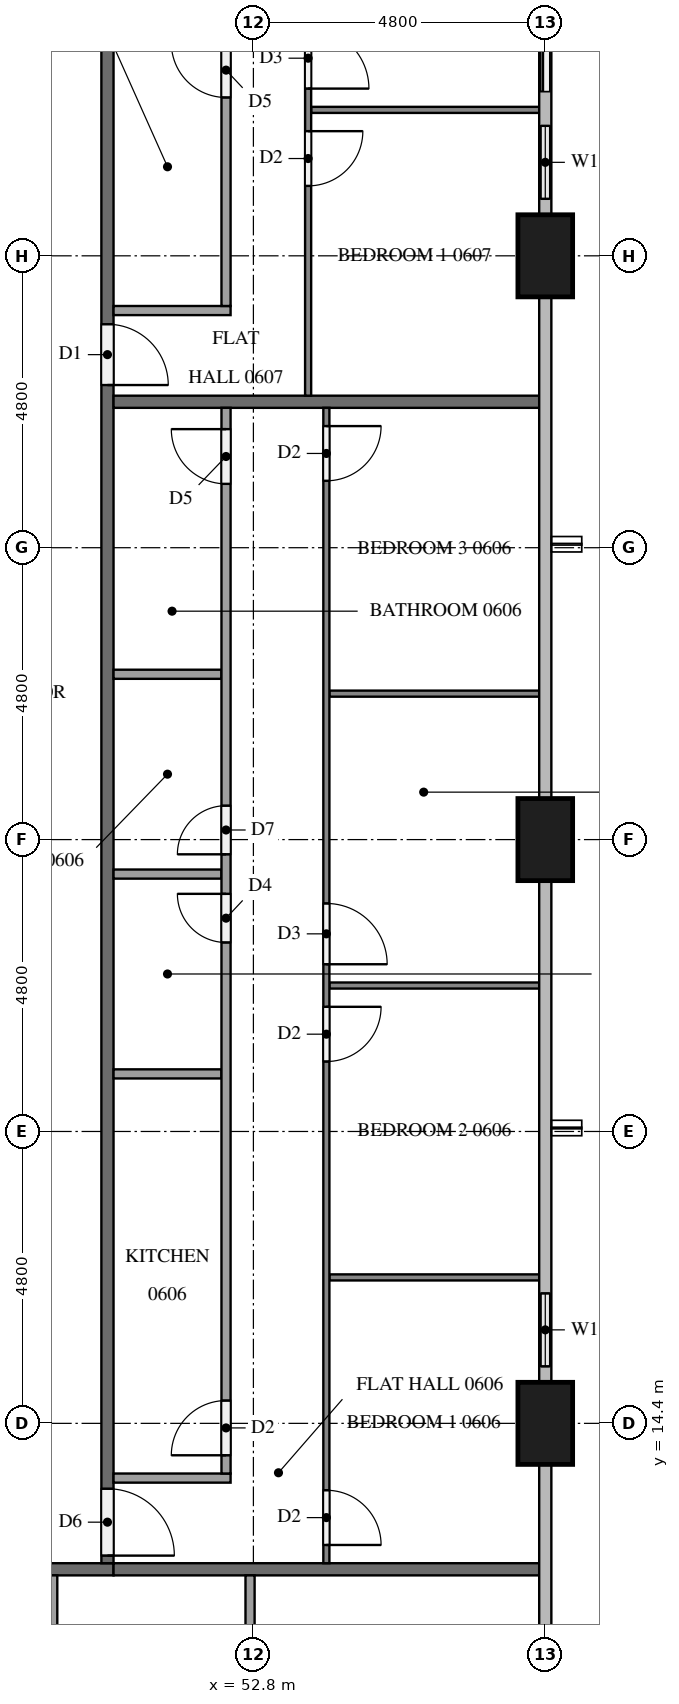
"""IFC4 building model, lengths in metres.
Left out: names, types, materials, properties, quantities, classifications, styles, units other than length and angle.
Written with IfcOpenShell. Run it as: python <this file> out.ifc"""

import sys

from ifc_helpers import new_model, si_unit, direction, frame, frame_2d, origin, origin_2d, place, context, subcontext, project, spatial, rectangle, extrude, element, fill, save


model = new_model("IFC4")
c1 = context("Model", 3, precision=1e-05, world=origin(), true_north=direction((0.0, 1.0)))
c2 = subcontext(c1, "Body", "Model", "MODEL_VIEW")
j1 = project(units=[si_unit("LENGTHUNIT", "METRE"), si_unit("PLANEANGLEUNIT", "RADIAN")], contexts=[c1])
p1 = place(None, origin())
s1 = spatial("IfcSite", under=j1, at=p1, CompositionType="ELEMENT")
p2 = place(p1, origin())
s2 = spatial("IfcBuilding", under=s1, at=p2, CompositionType="ELEMENT")
p3 = place(p2, frame((0.0, 0.0, 29.4)))
s3 = spatial("IfcBuildingStorey", under=s2, at=p3, CompositionType="ELEMENT", Elevation=29.4)
for number, where, z_axis, x_axis in (
    (1, (57.6, 14.4, 0.0), (0.0, 0.0, 1.0), (0.0, 1.0, 0.0)),
    (2, (57.6, 24.0, 0.0), (0.0, 0.0, 1.0), (0.0, 1.0, 0.0)),
    (3, (57.6, 33.6, 0.0), (0.0, 0.0, 1.0), (0.0, 1.0, 0.0)),
):
    element("IfcColumn", number, at=place(p3, frame(where, z_axis=z_axis, x_axis=x_axis)), inside=s3, PredefinedType="COLUMN", context=c2, shape_type="SweptSolid", body=[
        extrude(rectangle(XDim=1.35, YDim=0.9, at=origin_2d()), origin(), (0.0, 0.0, 1.0), 3.2),
    ])
p4 = place(p3, frame((57.6, 15.075, 0.0), z_axis=(0.0, 0.0, 1.0), x_axis=(0.0, 1.0, 0.0)))
e4 = element("IfcWall", 4, at=p4, inside=s3, PredefinedType="SOLIDWALL", context=c2, shape_type="SweptSolid", body=[
    extrude(rectangle(XDim=1.725, YDim=0.15, at=frame_2d((0.863, 0.0))), origin(), (0.0, 0.0, 1.0), 3.2),
])
p5 = place(p4, frame((0.262, 0.0, 0.9)))
e5 = element("IfcOpeningElement", 5, at=p5, cuts=e4, PredefinedType="OPENING", context=c2, shape_type="SweptSolid", body=[
    extrude(rectangle(XDim=1.2, YDim=1.4, at=frame_2d((0.6, 0.7))), frame((0.0, 0.085, 0.0), z_axis=(0.0, -1.0, 0.0), x_axis=(1.0, 0.0, 0.0)), (0.0, 0.0, 1.0), 0.17),
])
p6 = place(p3, frame((57.6, 34.275, 0.0), z_axis=(0.0, 0.0, 1.0), x_axis=(0.0, 1.0, 0.0)))
e6 = element("IfcWall", 6, at=p6, inside=s3, PredefinedType="SOLIDWALL", context=c2, shape_type="SweptSolid", body=[
    extrude(rectangle(XDim=4.125, YDim=0.15, at=frame_2d((2.062, 0.0))), origin(), (0.0, 0.0, 1.0), 3.2),
])
p7 = place(p6, frame((0.262, 0.0, 0.9)))
e7 = element("IfcOpeningElement", 7, at=p7, cuts=e6, PredefinedType="OPENING", context=c2, shape_type="SweptSolid", body=[
    extrude(rectangle(XDim=1.2, YDim=1.4, at=frame_2d((0.6, 0.7))), frame((0.0, 0.085, 0.0), z_axis=(0.0, -1.0, 0.0), x_axis=(1.0, 0.0, 0.0)), (0.0, 0.0, 1.0), 0.17),
])
p8 = place(p6, frame((2.025, 0.0, 0.0)))
e8 = element("IfcOpeningElement", 8, at=p8, cuts=e6, PredefinedType="OPENING", context=c2, shape_type="SweptSolid", body=[
    extrude(rectangle(XDim=1.8, YDim=2.4, at=frame_2d((0.9, 1.2))), frame((0.0, 0.085, 0.0), z_axis=(0.0, -1.0, 0.0), x_axis=(1.0, 0.0, 0.0)), (0.0, 0.0, 1.0), 0.17),
])
p9 = place(p3, frame((50.5, 12.0, 0.0), z_axis=(0.0, 0.0, 1.0), x_axis=(-1.0, 0.0, 0.0)))
e9 = element("IfcWall", 9, at=p9, inside=s3, PredefinedType="PARTITIONING", context=c2, shape_type="SweptSolid", body=[
    extrude(rectangle(XDim=38.6, YDim=0.2, at=frame_2d((19.3, 0.0))), origin(), (0.0, 0.0, 1.0), 3.2),
])
p10 = place(p9, frame((36.375, 0.0, 0.0)))
e10 = element("IfcOpeningElement", 10, at=p10, cuts=e9, PredefinedType="OPENING", context=c2, shape_type="SweptSolid", body=[
    extrude(rectangle(XDim=1.0, YDim=2.1, at=frame_2d((0.5, 1.05))), frame((0.0, 0.11, 0.0), z_axis=(0.0, -1.0, 0.0), x_axis=(1.0, 0.0, 0.0)), (0.0, 0.0, 1.0), 0.22),
])
p11 = place(p9, frame((34.825, 0.0, 0.0)))
e11 = element("IfcOpeningElement", 11, at=p11, cuts=e9, PredefinedType="OPENING", context=c2, shape_type="SweptSolid", body=[
    extrude(rectangle(XDim=1.0, YDim=2.1, at=frame_2d((0.5, 1.05))), frame((0.0, 0.11, 0.0), z_axis=(0.0, -1.0, 0.0), x_axis=(1.0, 0.0, 0.0)), (0.0, 0.0, 1.0), 0.22),
])
p12 = place(p9, frame((22.825, 0.0, 0.0)))
e12 = element("IfcOpeningElement", 12, at=p12, cuts=e9, PredefinedType="OPENING", context=c2, shape_type="SweptSolid", body=[
    extrude(rectangle(XDim=1.0, YDim=2.1, at=frame_2d((0.5, 1.05))), frame((0.0, 0.11, 0.0), z_axis=(0.0, -1.0, 0.0), x_axis=(1.0, 0.0, 0.0)), (0.0, 0.0, 1.0), 0.22),
])
p13 = place(p9, frame((8.425, 0.0, 0.0)))
e13 = element("IfcOpeningElement", 13, at=p13, cuts=e9, PredefinedType="OPENING", context=c2, shape_type="SweptSolid", body=[
    extrude(rectangle(XDim=1.0, YDim=2.1, at=frame_2d((0.5, 1.05))), frame((0.0, 0.11, 0.0), z_axis=(0.0, -1.0, 0.0), x_axis=(1.0, 0.0, 0.0)), (0.0, 0.0, 1.0), 0.22),
])
p14 = place(p9, frame((1.225, 0.0, 0.0)))
e14 = element("IfcOpeningElement", 14, at=p14, cuts=e9, PredefinedType="OPENING", context=c2, shape_type="SweptSolid", body=[
    extrude(rectangle(XDim=1.0, YDim=2.1, at=frame_2d((0.5, 1.05))), frame((0.0, 0.11, 0.0), z_axis=(0.0, -1.0, 0.0), x_axis=(1.0, 0.0, 0.0)), (0.0, 0.0, 1.0), 0.22),
])
p15 = place(p3, frame((50.4, 40.7, 0.0), z_axis=(0.0, 0.0, 1.0), x_axis=(0.0, -1.0, 0.0)))
e15 = element("IfcWall", 15, at=p15, inside=s3, PredefinedType="PARTITIONING", context=c2, shape_type="SweptSolid", body=[
    extrude(rectangle(XDim=28.6, YDim=0.2, at=frame_2d((14.3, 0.0))), origin(), (0.0, 0.0, 1.0), 3.2),
])
p16 = place(p15, frame((27.375, 0.0, 0.0)))
e16 = element("IfcOpeningElement", 16, at=p16, cuts=e15, PredefinedType="OPENING", context=c2, shape_type="SweptSolid", body=[
    extrude(rectangle(XDim=1.1, YDim=2.1, at=frame_2d((0.55, 1.05))), frame((0.0, 0.11, 0.0), z_axis=(0.0, -1.0, 0.0), x_axis=(1.0, 0.0, 0.0)), (0.0, 0.0, 1.0), 0.22),
])
p17 = place(p15, frame((8.225, 0.0, 0.0)))
e17 = element("IfcOpeningElement", 17, at=p17, cuts=e15, PredefinedType="OPENING", context=c2, shape_type="SweptSolid", body=[
    extrude(rectangle(XDim=1.0, YDim=2.1, at=frame_2d((0.5, 1.05))), frame((0.0, 0.11, 0.0), z_axis=(0.0, -1.0, 0.0), x_axis=(1.0, 0.0, 0.0)), (0.0, 0.0, 1.0), 0.22),
])
for number, where, z_axis, x_axis in (
    (18, (50.5, 12.0, 0.0), (0.0, 0.0, 1.0), (1.0, 0.0, 0.0)),
    (19, (50.5, 31.2, 0.0), (0.0, 0.0, 1.0), (1.0, 0.0, 0.0)),
):
    element("IfcWall", number, at=place(p3, frame(where, z_axis=z_axis, x_axis=x_axis)), inside=s3, PredefinedType="PARTITIONING", context=c2, shape_type="SweptSolid", body=[
        extrude(rectangle(XDim=7.0, YDim=0.2, at=frame_2d((3.5, 0.0))), origin(), (0.0, 0.0, 1.0), 3.2),
    ])
p18 = place(p3, frame((52.745, 11.9, 0.0), z_axis=(0.0, 0.0, 1.0), x_axis=(0.0, -1.0, 0.0)))
e20 = element("IfcWall", 20, at=p18, inside=s3, PredefinedType="PARTITIONING", context=c2, shape_type="SweptSolid", body=[
    extrude(rectangle(XDim=3.275, YDim=0.15, at=frame_2d((1.637, 0.0))), origin(), (0.0, 0.0, 1.0), 3.2),
])
p19 = place(p3, frame((49.5, 11.9, 0.0), z_axis=(0.0, 0.0, 1.0), x_axis=(0.0, -1.0, 0.0)))
e21 = element("IfcWall", 21, at=p19, inside=s3, PredefinedType="PARTITIONING", context=c2, shape_type="SweptSolid", body=[
    extrude(rectangle(XDim=3.425, YDim=0.15, at=frame_2d((1.712, 0.0))), origin(), (0.0, 0.0, 1.0), 3.2),
])
for number, where, z_axis, x_axis in (
    (22, (54.05, 16.8, 0.0), (0.0, 0.0, 1.0), (1.0, 0.0, 0.0)),
    (23, (54.05, 21.6, 0.0), (0.0, 0.0, 1.0), (1.0, 0.0, 0.0)),
    (24, (54.05, 26.4, 0.0), (0.0, 0.0, 1.0), (1.0, 0.0, 0.0)),
):
    element("IfcWall", number, at=place(p3, frame(where, z_axis=z_axis, x_axis=x_axis)), inside=s3, PredefinedType="PARTITIONING", context=c2, shape_type="SweptSolid", body=[
        extrude(rectangle(XDim=3.45, YDim=0.1, at=frame_2d((1.725, 0.0))), origin(), (0.0, 0.0, 1.0), 3.2),
    ])
p20 = place(p3, frame((54.0, 31.1, 0.0), z_axis=(0.0, 0.0, 1.0), x_axis=(0.0, -1.0, 0.0)))
e25 = element("IfcWall", 25, at=p20, inside=s3, PredefinedType="PARTITIONING", context=c2, shape_type="SweptSolid", body=[
    extrude(rectangle(XDim=19.0, YDim=0.1, at=frame_2d((9.5, 0.0))), origin(), (0.0, 0.0, 1.0), 3.2),
])
p21 = place(p20, frame((17.8, 0.0, 0.0)))
e26 = element("IfcOpeningElement", 26, at=p21, cuts=e25, PredefinedType="OPENING", context=c2, shape_type="SweptSolid", body=[
    extrude(rectangle(XDim=0.9, YDim=2.1, at=frame_2d((0.45, 1.05))), frame((0.0, 0.06, 0.0), z_axis=(0.0, -1.0, 0.0), x_axis=(1.0, 0.0, 0.0)), (0.0, 0.0, 1.0), 0.12),
])
p22 = place(p20, frame((9.85, 0.0, 0.0)))
e27 = element("IfcOpeningElement", 27, at=p22, cuts=e25, PredefinedType="OPENING", context=c2, shape_type="SweptSolid", body=[
    extrude(rectangle(XDim=0.9, YDim=2.1, at=frame_2d((0.45, 1.05))), frame((0.0, 0.06, 0.0), z_axis=(0.0, -1.0, 0.0), x_axis=(1.0, 0.0, 0.0)), (0.0, 0.0, 1.0), 0.12),
])
p23 = place(p20, frame((8.15, 0.0, 0.0)))
e28 = element("IfcOpeningElement", 28, at=p23, cuts=e25, PredefinedType="OPENING", context=c2, shape_type="SweptSolid", body=[
    extrude(rectangle(XDim=1.0, YDim=2.1, at=frame_2d((0.5, 1.05))), frame((0.0, 0.06, 0.0), z_axis=(0.0, -1.0, 0.0), x_axis=(1.0, 0.0, 0.0)), (0.0, 0.0, 1.0), 0.12),
])
p24 = place(p20, frame((0.3, 0.0, 0.0)))
e29 = element("IfcOpeningElement", 29, at=p24, cuts=e25, PredefinedType="OPENING", context=c2, shape_type="SweptSolid", body=[
    extrude(rectangle(XDim=0.9, YDim=2.1, at=frame_2d((0.45, 1.05))), frame((0.0, 0.06, 0.0), z_axis=(0.0, -1.0, 0.0), x_axis=(1.0, 0.0, 0.0)), (0.0, 0.0, 1.0), 0.12),
])
for number, where, z_axis, x_axis in (
    (30, (50.5, 20.147, 0.0), (0.0, 0.0, 1.0), (1.0, 0.0, 0.0)),
    (31, (50.5, 23.433, 0.0), (0.0, 0.0, 1.0), (1.0, 0.0, 0.0)),
    (32, (50.5, 26.719, 0.0), (0.0, 0.0, 1.0), (1.0, 0.0, 0.0)),
):
    element("IfcWall", number, at=place(p3, frame(where, z_axis=z_axis, x_axis=x_axis)), inside=s3, PredefinedType="PARTITIONING", context=c2, shape_type="SweptSolid", body=[
        extrude(rectangle(XDim=1.775, YDim=0.15, at=frame_2d((0.887, 0.0))), origin(), (0.0, 0.0, 1.0), 3.2),
    ])
p25 = place(p3, frame((50.5, 13.5, 0.0), z_axis=(0.0, 0.0, 1.0), x_axis=(1.0, 0.0, 0.0)))
e33 = element("IfcWall", 33, at=p25, inside=s3, PredefinedType="PARTITIONING", context=c2, shape_type="SweptSolid", body=[
    extrude(rectangle(XDim=1.925, YDim=0.15, at=frame_2d((0.962, 0.0))), origin(), (0.0, 0.0, 1.0), 3.2),
])
p26 = place(p3, frame((52.35, 13.575, 0.0), z_axis=(0.0, 0.0, 1.0), x_axis=(0.0, 1.0, 0.0)))
e34 = element("IfcWall", 34, at=p26, inside=s3, PredefinedType="PARTITIONING", context=c2, shape_type="SweptSolid", body=[
    extrude(rectangle(XDim=17.525, YDim=0.15, at=frame_2d((8.763, 0.0))), origin(), (0.0, 0.0, 1.0), 3.2),
])
p27 = place(p26, frame((0.3, 0.0, 0.0)))
e35 = element("IfcOpeningElement", 35, at=p27, cuts=e34, PredefinedType="OPENING", context=c2, shape_type="SweptSolid", body=[
    extrude(rectangle(XDim=0.9, YDim=2.1, at=frame_2d((0.45, 1.05))), frame((0.0, 0.085, 0.0), z_axis=(0.0, -1.0, 0.0), x_axis=(1.0, 0.0, 0.0)), (0.0, 0.0, 1.0), 0.17),
])
p28 = place(p26, frame((8.733, 0.0, 0.0)))
e36 = element("IfcOpeningElement", 36, at=p28, cuts=e34, PredefinedType="OPENING", context=c2, shape_type="SweptSolid", body=[
    extrude(rectangle(XDim=0.8, YDim=2.1, at=frame_2d((0.4, 1.05))), frame((0.0, 0.085, 0.0), z_axis=(0.0, -1.0, 0.0), x_axis=(1.0, 0.0, 0.0)), (0.0, 0.0, 1.0), 0.17),
])
p29 = place(p26, frame((10.183, 0.0, 0.0)))
e37 = element("IfcOpeningElement", 37, at=p29, cuts=e34, PredefinedType="OPENING", context=c2, shape_type="SweptSolid", body=[
    extrude(rectangle(XDim=0.8, YDim=2.1, at=frame_2d((0.4, 1.05))), frame((0.0, 0.085, 0.0), z_axis=(0.0, -1.0, 0.0), x_axis=(1.0, 0.0, 0.0)), (0.0, 0.0, 1.0), 0.17),
])
p30 = place(p26, frame((16.275, 0.0, 0.0)))
e38 = element("IfcOpeningElement", 38, at=p30, cuts=e34, PredefinedType="OPENING", context=c2, shape_type="SweptSolid", body=[
    extrude(rectangle(XDim=0.9, YDim=2.1, at=frame_2d((0.45, 1.05))), frame((0.0, 0.085, 0.0), z_axis=(0.0, -1.0, 0.0), x_axis=(1.0, 0.0, 0.0)), (0.0, 0.0, 1.0), 0.17),
])
p31 = place(p3, frame((53.75, 36.0, 0.0), z_axis=(0.0, 0.0, 1.0), x_axis=(1.0, 0.0, 0.0)))
e39 = element("IfcWall", 39, at=p31, inside=s3, PredefinedType="PARTITIONING", context=c2, shape_type="SweptSolid", body=[
    extrude(rectangle(XDim=3.75, YDim=0.1, at=frame_2d((1.875, 0.0))), origin(), (0.0, 0.0, 1.0), 3.2),
])
p32 = place(p3, frame((53.7, 47.659, 0.0), z_axis=(0.0, 0.0, 1.0), x_axis=(0.0, -1.0, 0.0)))
e40 = element("IfcWall", 40, at=p32, inside=s3, PredefinedType="PARTITIONING", context=c2, shape_type="SweptSolid", body=[
    extrude(rectangle(XDim=16.359, YDim=0.1, at=frame_2d((8.179, 0.0))), origin(), (0.0, 0.0, 1.0), 3.2),
])
p33 = place(p32, frame((12.009, 0.0, 0.0)))
e41 = element("IfcOpeningElement", 41, at=p33, cuts=e40, PredefinedType="OPENING", context=c2, shape_type="SweptSolid", body=[
    extrude(rectangle(XDim=0.9, YDim=2.1, at=frame_2d((0.45, 1.05))), frame((0.0, 0.06, 0.0), z_axis=(0.0, -1.0, 0.0), x_axis=(1.0, 0.0, 0.0)), (0.0, 0.0, 1.0), 0.12),
])
p34 = place(p32, frame((10.309, 0.0, 0.0)))
e42 = element("IfcOpeningElement", 42, at=p34, cuts=e40, PredefinedType="OPENING", context=c2, shape_type="SweptSolid", body=[
    extrude(rectangle(XDim=1.0, YDim=2.1, at=frame_2d((0.5, 1.05))), frame((0.0, 0.06, 0.0), z_axis=(0.0, -1.0, 0.0), x_axis=(1.0, 0.0, 0.0)), (0.0, 0.0, 1.0), 0.12),
])
p35 = place(p32, frame((0.3, 0.0, 0.0)))
e43 = element("IfcOpeningElement", 43, at=p35, cuts=e40, PredefinedType="OPENING", context=c2, shape_type="SweptSolid", body=[
    extrude(rectangle(XDim=0.9, YDim=2.1, at=frame_2d((0.45, 1.05))), frame((0.0, 0.06, 0.0), z_axis=(0.0, -1.0, 0.0), x_axis=(1.0, 0.0, 0.0)), (0.0, 0.0, 1.0), 0.12),
])
p36 = place(p3, frame((50.5, 32.7, 0.0), z_axis=(0.0, 0.0, 1.0), x_axis=(1.0, 0.0, 0.0)))
e44 = element("IfcWall", 44, at=p36, inside=s3, PredefinedType="PARTITIONING", context=c2, shape_type="SweptSolid", body=[
    extrude(rectangle(XDim=1.925, YDim=0.15, at=frame_2d((0.962, 0.0))), origin(), (0.0, 0.0, 1.0), 3.2),
])
p37 = place(p3, frame((52.35, 32.775, 0.0), z_axis=(0.0, 0.0, 1.0), x_axis=(0.0, 1.0, 0.0)))
e45 = element("IfcWall", 45, at=p37, inside=s3, PredefinedType="PARTITIONING", context=c2, shape_type="SweptSolid", body=[
    extrude(rectangle(XDim=14.6, YDim=0.15, at=frame_2d((7.3, 0.0))), origin(), (0.0, 0.0, 1.0), 3.2),
])
p38 = place(p37, frame((3.429, 0.0, 0.0)))
e46 = element("IfcOpeningElement", 46, at=p38, cuts=e45, PredefinedType="OPENING", context=c2, shape_type="SweptSolid", body=[
    extrude(rectangle(XDim=0.9, YDim=2.1, at=frame_2d((0.45, 1.05))), frame((0.0, 0.085, 0.0), z_axis=(0.0, -1.0, 0.0), x_axis=(1.0, 0.0, 0.0)), (0.0, 0.0, 1.0), 0.17),
])
p39 = place(p37, frame((4.979, 0.0, 0.0)))
e47 = element("IfcOpeningElement", 47, at=p39, cuts=e45, PredefinedType="OPENING", context=c2, shape_type="SweptSolid", body=[
    extrude(rectangle(XDim=0.8, YDim=2.1, at=frame_2d((0.4, 1.05))), frame((0.0, 0.085, 0.0), z_axis=(0.0, -1.0, 0.0), x_axis=(1.0, 0.0, 0.0)), (0.0, 0.0, 1.0), 0.17),
])
p40 = place(p37, frame((13.4, 0.0, 0.0)))
e48 = element("IfcOpeningElement", 48, at=p40, cuts=e45, PredefinedType="OPENING", context=c2, shape_type="SweptSolid", body=[
    extrude(rectangle(XDim=0.9, YDim=2.1, at=frame_2d((0.45, 1.05))), frame((0.0, 0.085, 0.0), z_axis=(0.0, -1.0, 0.0), x_axis=(1.0, 0.0, 0.0)), (0.0, 0.0, 1.0), 0.17),
])
p41 = place(p5, origin())
e49 = element("IfcWindow", 49, at=p41, inside=s3, PartitioningType="SINGLE_PANEL", PredefinedType="WINDOW", context=c2, shape_type="SweptSolid", body=[
    extrude(rectangle(XDim=1.2, YDim=1.4, at=frame_2d((0.6, 0.7))), frame((0.0, 0.03, 0.0), z_axis=(0.0, -1.0, 0.0), x_axis=(1.0, 0.0, 0.0)), (0.0, 0.0, 1.0), 0.06),
])
fill(e5, e49)
p42 = place(p7, origin())
e50 = element("IfcWindow", 50, at=p42, inside=s3, PartitioningType="SINGLE_PANEL", PredefinedType="WINDOW", context=c2, shape_type="SweptSolid", body=[
    extrude(rectangle(XDim=1.2, YDim=1.4, at=frame_2d((0.6, 0.7))), frame((0.0, 0.03, 0.0), z_axis=(0.0, -1.0, 0.0), x_axis=(1.0, 0.0, 0.0)), (0.0, 0.0, 1.0), 0.06),
])
fill(e7, e50)
p43 = place(p8, origin())
e51 = element("IfcDoor", 51, at=p43, inside=s3, OperationType="SLIDING_TO_RIGHT", PredefinedType="DOOR", context=c2, shape_type="SweptSolid", body=[
    extrude(rectangle(XDim=1.8, YDim=2.4, at=frame_2d((0.9, 1.2))), frame((0.0, 0.025, 0.0), z_axis=(0.0, -1.0, 0.0), x_axis=(1.0, 0.0, 0.0)), (0.0, 0.0, 1.0), 0.05),
])
fill(e8, e51)
p44 = place(p16, origin())
e52 = element("IfcDoor", 52, at=p44, inside=s3, OperationType="SINGLE_SWING_RIGHT", PredefinedType="DOOR", context=c2, shape_type="SweptSolid", body=[
    extrude(rectangle(XDim=1.1, YDim=2.1, at=frame_2d((0.55, 1.05))), frame((0.0, 0.025, 0.0), z_axis=(0.0, -1.0, 0.0), x_axis=(1.0, 0.0, 0.0)), (0.0, 0.0, 1.0), 0.05),
])
fill(e16, e52)
p45 = place(p17, origin())
e53 = element("IfcDoor", 53, at=p45, inside=s3, OperationType="SINGLE_SWING_RIGHT", PredefinedType="DOOR", context=c2, shape_type="SweptSolid", body=[
    extrude(rectangle(XDim=1.0, YDim=2.1, at=frame_2d((0.5, 1.05))), frame((0.0, 0.025, 0.0), z_axis=(0.0, -1.0, 0.0), x_axis=(1.0, 0.0, 0.0)), (0.0, 0.0, 1.0), 0.05),
])
fill(e17, e53)
p46 = place(p21, origin())
e54 = element("IfcDoor", 54, at=p46, inside=s3, OperationType="SINGLE_SWING_RIGHT", PredefinedType="DOOR", context=c2, shape_type="SweptSolid", body=[
    extrude(rectangle(XDim=0.9, YDim=2.1, at=frame_2d((0.45, 1.05))), frame((0.0, 0.025, 0.0), z_axis=(0.0, -1.0, 0.0), x_axis=(1.0, 0.0, 0.0)), (0.0, 0.0, 1.0), 0.05),
])
fill(e26, e54)
p47 = place(p22, origin())
e55 = element("IfcDoor", 55, at=p47, inside=s3, OperationType="SINGLE_SWING_LEFT", PredefinedType="DOOR", context=c2, shape_type="SweptSolid", body=[
    extrude(rectangle(XDim=0.9, YDim=2.1, at=frame_2d((0.45, 1.05))), frame((0.0, 0.025, 0.0), z_axis=(0.0, -1.0, 0.0), x_axis=(1.0, 0.0, 0.0)), (0.0, 0.0, 1.0), 0.05),
])
fill(e27, e55)
p48 = place(p23, origin())
e56 = element("IfcDoor", 56, at=p48, inside=s3, OperationType="SINGLE_SWING_RIGHT", PredefinedType="DOOR", context=c2, shape_type="SweptSolid", body=[
    extrude(rectangle(XDim=1.0, YDim=2.1, at=frame_2d((0.5, 1.05))), frame((0.0, 0.025, 0.0), z_axis=(0.0, -1.0, 0.0), x_axis=(1.0, 0.0, 0.0)), (0.0, 0.0, 1.0), 0.05),
])
fill(e28, e56)
p49 = place(p24, origin())
e57 = element("IfcDoor", 57, at=p49, inside=s3, OperationType="SINGLE_SWING_LEFT", PredefinedType="DOOR", context=c2, shape_type="SweptSolid", body=[
    extrude(rectangle(XDim=0.9, YDim=2.1, at=frame_2d((0.45, 1.05))), frame((0.0, 0.025, 0.0), z_axis=(0.0, -1.0, 0.0), x_axis=(1.0, 0.0, 0.0)), (0.0, 0.0, 1.0), 0.05),
])
fill(e29, e57)
p50 = place(p27, origin())
e58 = element("IfcDoor", 58, at=p50, inside=s3, OperationType="SINGLE_SWING_LEFT", PredefinedType="DOOR", context=c2, shape_type="SweptSolid", body=[
    extrude(rectangle(XDim=0.9, YDim=2.1, at=frame_2d((0.45, 1.05))), frame((0.0, 0.025, 0.0), z_axis=(0.0, -1.0, 0.0), x_axis=(1.0, 0.0, 0.0)), (0.0, 0.0, 1.0), 0.05),
])
fill(e35, e58)
p51 = place(p28, origin())
e59 = element("IfcDoor", 59, at=p51, inside=s3, OperationType="SINGLE_SWING_RIGHT", PredefinedType="DOOR", context=c2, shape_type="SweptSolid", body=[
    extrude(rectangle(XDim=0.8, YDim=2.1, at=frame_2d((0.4, 1.05))), frame((0.0, 0.025, 0.0), z_axis=(0.0, -1.0, 0.0), x_axis=(1.0, 0.0, 0.0)), (0.0, 0.0, 1.0), 0.05),
])
fill(e36, e59)
p52 = place(p29, origin())
e60 = element("IfcDoor", 60, at=p52, inside=s3, OperationType="SINGLE_SWING_LEFT", PredefinedType="DOOR", context=c2, shape_type="SweptSolid", body=[
    extrude(rectangle(XDim=0.8, YDim=2.1, at=frame_2d((0.4, 1.05))), frame((0.0, 0.025, 0.0), z_axis=(0.0, -1.0, 0.0), x_axis=(1.0, 0.0, 0.0)), (0.0, 0.0, 1.0), 0.05),
])
fill(e37, e60)
p53 = place(p30, origin())
e61 = element("IfcDoor", 61, at=p53, inside=s3, OperationType="SINGLE_SWING_RIGHT", PredefinedType="DOOR", context=c2, shape_type="SweptSolid", body=[
    extrude(rectangle(XDim=0.9, YDim=2.1, at=frame_2d((0.45, 1.05))), frame((0.0, 0.025, 0.0), z_axis=(0.0, -1.0, 0.0), x_axis=(1.0, 0.0, 0.0)), (0.0, 0.0, 1.0), 0.05),
])
fill(e38, e61)
p54 = place(p33, origin())
e62 = element("IfcDoor", 62, at=p54, inside=s3, OperationType="SINGLE_SWING_LEFT", PredefinedType="DOOR", context=c2, shape_type="SweptSolid", body=[
    extrude(rectangle(XDim=0.9, YDim=2.1, at=frame_2d((0.45, 1.05))), frame((0.0, 0.025, 0.0), z_axis=(0.0, -1.0, 0.0), x_axis=(1.0, 0.0, 0.0)), (0.0, 0.0, 1.0), 0.05),
])
fill(e41, e62)
p55 = place(p34, origin())
e63 = element("IfcDoor", 63, at=p55, inside=s3, OperationType="SINGLE_SWING_RIGHT", PredefinedType="DOOR", context=c2, shape_type="SweptSolid", body=[
    extrude(rectangle(XDim=1.0, YDim=2.1, at=frame_2d((0.5, 1.05))), frame((0.0, 0.025, 0.0), z_axis=(0.0, -1.0, 0.0), x_axis=(1.0, 0.0, 0.0)), (0.0, 0.0, 1.0), 0.05),
])
fill(e42, e63)
p56 = place(p38, origin())
e64 = element("IfcDoor", 64, at=p56, inside=s3, OperationType="SINGLE_SWING_RIGHT", PredefinedType="DOOR", context=c2, shape_type="SweptSolid", body=[
    extrude(rectangle(XDim=0.9, YDim=2.1, at=frame_2d((0.45, 1.05))), frame((0.0, 0.025, 0.0), z_axis=(0.0, -1.0, 0.0), x_axis=(1.0, 0.0, 0.0)), (0.0, 0.0, 1.0), 0.05),
])
fill(e46, e64)
save(model, sys.argv[1])
